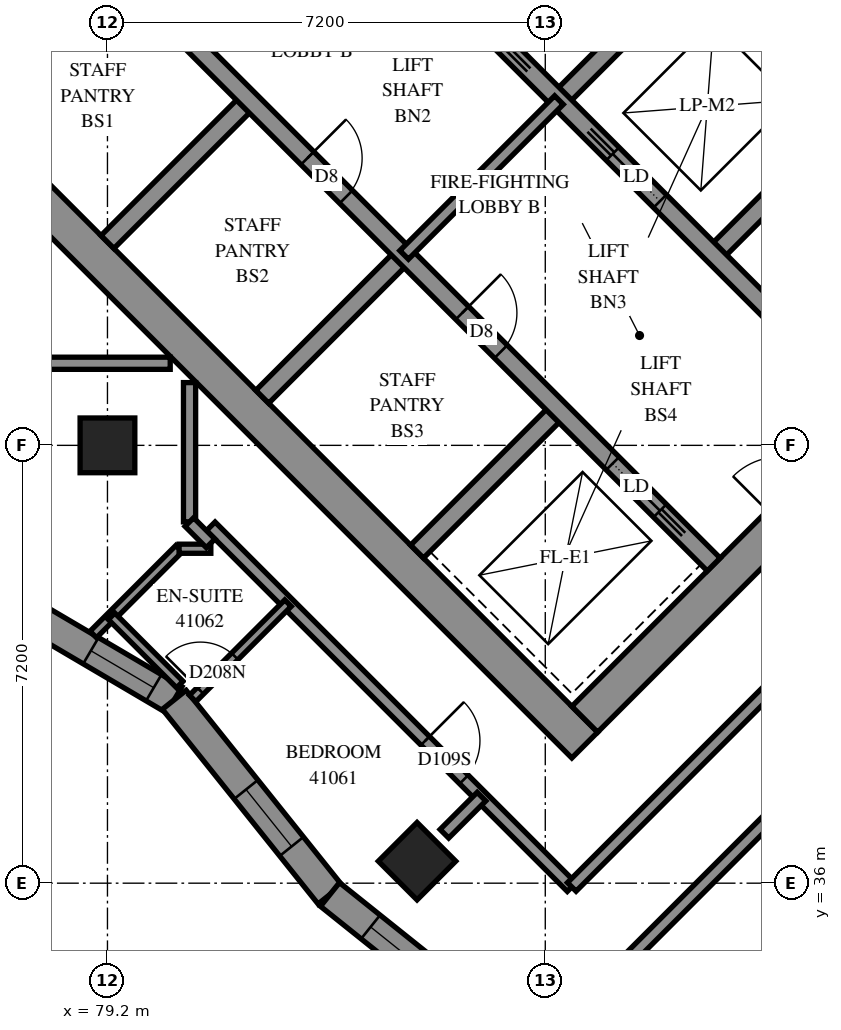
"""IFC4 building model, lengths in metres.
Left out: names, types, materials, properties, quantities, classifications, styles, units other than length and angle.
Written with IfcOpenShell. Run it as: python <this file> out.ifc"""

import sys

from ifc_helpers import new_model, si_unit, direction, frame, frame_2d, origin, origin_2d, place, context, subcontext, project, spatial, polyline, rectangle, outline, extrude, element, fill, save


model = new_model("IFC4")
c1 = context("Model", 3, precision=1e-05, world=origin(), true_north=direction((0.0, 1.0)))
c2 = subcontext(c1, "Body", "Model", "MODEL_VIEW")
j1 = project(units=[si_unit("LENGTHUNIT", "METRE"), si_unit("PLANEANGLEUNIT", "RADIAN")], contexts=[c1])
p1 = place(None, origin())
s1 = spatial("IfcSite", under=j1, at=p1, CompositionType="ELEMENT")
p2 = place(p1, origin())
s2 = spatial("IfcBuilding", under=s1, at=p2, CompositionType="ELEMENT")
p3 = place(p2, frame((0.0, 0.0, 152.4)))
s3 = spatial("IfcBuildingStorey", under=s2, at=p3, CompositionType="ELEMENT", Elevation=152.4)
for number, where, z_axis, x_axis in (
    (1, (79.2, 43.2, 0.0), (0.0, 0.0, 1.0), (1.0, 0.0, 0.0)),
    (2, (84.291, 36.362, 0.0), (0.0, 0.0, 1.0), (0.707, -0.707, 0.0)),
):
    element("IfcColumn", number, at=place(p3, frame(where, z_axis=z_axis, x_axis=x_axis)), inside=s3, PredefinedType="COLUMN", context=c2, shape_type="SweptSolid", body=[
        extrude(rectangle(XDim=0.9, YDim=0.9, at=origin_2d()), origin(), (0.0, 0.0, 1.0), 3.1),
    ])
p4 = place(p3, frame((76.018, 49.302, -0.3), z_axis=(0.0, 0.0, 1.0), x_axis=(0.7071067812, -0.7071067812, 0.0)))
e3 = element("IfcWall", 3, at=p4, inside=s3, PredefinedType="SHEAR", context=c2, shape_type="SweptSolid", body=[
    extrude(rectangle(XDim=15.6, YDim=0.6, at=frame_2d((7.8, 0.0))), origin(), (0.0, 0.0, 1.0), 2.7),
])
p5 = place(p3, frame((86.625, 59.908, -0.3), z_axis=(0.0, 0.0, 1.0), x_axis=(0.7071067812, -0.7071067812, 0.0)))
e4 = element("IfcWall", 4, at=p5, inside=s3, PredefinedType="SHEAR", context=c2, shape_type="SweptSolid", body=[
    extrude(rectangle(XDim=15.6, YDim=0.6, at=frame_2d((7.8, 0.0))), origin(), (0.0, 0.0, 1.0), 2.7),
])
p6 = place(p5, frame((10.6, 0.0, 0.3)))
e5 = element("IfcOpeningElement", 5, at=p6, cuts=e4, PredefinedType="OPENING", context=c2, shape_type="SweptSolid", body=[
    extrude(rectangle(XDim=0.8, YDim=2.1, at=frame_2d((0.4, 1.05))), frame((0.0, 0.31, 0.0), z_axis=(0.0, -1.0, 0.0), x_axis=(1.0, 0.0, 0.0)), (0.0, 0.0, 1.0), 0.62),
])
p7 = place(p3, frame((76.442, 49.302, -0.3), z_axis=(0.0, 0.0, 1.0), x_axis=(0.7071067812, 0.7071067812, 0.0)))
e6 = element("IfcWall", 6, at=p7, inside=s3, PredefinedType="SHEAR", context=c2, shape_type="SweptSolid", body=[
    extrude(rectangle(XDim=14.4, YDim=0.6, at=frame_2d((7.2, 0.0))), origin(), (0.0, 0.0, 1.0), 2.7),
])
p8 = place(p7, frame((4.55, 0.0, 0.3)))
e7 = element("IfcOpeningElement", 7, at=p8, cuts=e6, PredefinedType="OPENING", context=c2, shape_type="SweptSolid", body=[
    extrude(rectangle(XDim=1.1, YDim=2.1, at=frame_2d((0.55, 1.05))), frame((0.0, 0.31, 0.0), z_axis=(0.0, -1.0, 0.0), x_axis=(1.0, 0.0, 0.0)), (0.0, 0.0, 1.0), 0.62),
])
p9 = place(p7, frame((11.35, 0.0, 0.3)))
e8 = element("IfcOpeningElement", 8, at=p9, cuts=e6, PredefinedType="OPENING", context=c2, shape_type="SweptSolid", body=[
    extrude(rectangle(XDim=1.1, YDim=2.1, at=frame_2d((0.55, 1.05))), frame((0.0, 0.31, 0.0), z_axis=(0.0, -1.0, 0.0), x_axis=(1.0, 0.0, 0.0)), (0.0, 0.0, 1.0), 0.62),
])
p10 = place(p3, frame((87.049, 38.695, -0.3), z_axis=(0.0, 0.0, 1.0), x_axis=(0.7071067812, 0.7071067812, 0.0)))
e9 = element("IfcWall", 9, at=p10, inside=s3, PredefinedType="SHEAR", context=c2, shape_type="SweptSolid", body=[
    extrude(rectangle(XDim=14.4, YDim=0.6, at=frame_2d((7.2, 0.0))), origin(), (0.0, 0.0, 1.0), 2.7),
])
p11 = place(p10, frame((4.55, 0.0, 0.3)))
e10 = element("IfcOpeningElement", 10, at=p11, cuts=e9, PredefinedType="OPENING", context=c2, shape_type="SweptSolid", body=[
    extrude(rectangle(XDim=1.1, YDim=2.1, at=frame_2d((0.55, 1.05))), frame((0.0, 0.31, 0.0), z_axis=(0.0, -1.0, 0.0), x_axis=(1.0, 0.0, 0.0)), (0.0, 0.0, 1.0), 0.62),
])
p12 = place(p10, frame((11.35, 0.0, 0.3)))
e11 = element("IfcOpeningElement", 11, at=p12, cuts=e9, PredefinedType="OPENING", context=c2, shape_type="SweptSolid", body=[
    extrude(rectangle(XDim=1.1, YDim=2.1, at=frame_2d((0.55, 1.05))), frame((0.0, 0.31, 0.0), z_axis=(0.0, -1.0, 0.0), x_axis=(1.0, 0.0, 0.0)), (0.0, 0.0, 1.0), 0.62),
])
p13 = place(p3, frame((79.2, 46.544, 0.0), z_axis=(0.0, 0.0, 1.0), x_axis=(0.7071219326, 0.7070916295, 0.0)))
e12 = element("IfcWall", 12, at=p13, inside=s3, PredefinedType="SOLIDWALL", context=c2, shape_type="SweptSolid", body=[
    extrude(rectangle(XDim=3.3, YDim=0.3, at=frame_2d((1.65, 0.0))), origin(), (0.0, 0.0, 1.0), 3.1),
])
p14 = place(p3, frame((81.746, 43.999, 0.0), z_axis=(0.0, 0.0, 1.0), x_axis=(0.7071067812, 0.7071067812, 0.0)))
e13 = element("IfcWall", 13, at=p14, inside=s3, PredefinedType="SOLIDWALL", context=c2, shape_type="SweptSolid", body=[
    extrude(rectangle(XDim=3.3, YDim=0.3, at=frame_2d((1.65, 0.0))), origin(), (0.0, 0.0, 1.0), 3.1),
])
p15 = place(p3, frame((86.625, 48.878, 0.0), z_axis=(0.0, 0.0, 1.0), x_axis=(0.7071067812, 0.7071067812, 0.0)))
e14 = element("IfcWall", 14, at=p15, inside=s3, PredefinedType="SOLIDWALL", context=c2, shape_type="SweptSolid", body=[
    extrude(rectangle(XDim=3.3, YDim=0.3, at=frame_2d((1.65, 0.0))), origin(), (0.0, 0.0, 1.0), 3.1),
])
p16 = place(p3, frame((84.291, 41.453, 0.0), z_axis=(0.0, 0.0, 1.0), x_axis=(0.7071067812, 0.7071067812, 0.0)))
e15 = element("IfcWall", 15, at=p16, inside=s3, PredefinedType="SOLIDWALL", context=c2, shape_type="SweptSolid", body=[
    extrude(rectangle(XDim=3.3, YDim=0.3, at=frame_2d((1.65, 0.0))), origin(), (0.0, 0.0, 1.0), 3.1),
])
p17 = place(p3, frame((89.17, 46.332, 0.0), z_axis=(0.0, 0.0, 1.0), x_axis=(0.7071067812, 0.7071067812, 0.0)))
e16 = element("IfcWall", 16, at=p17, inside=s3, PredefinedType="SOLIDWALL", context=c2, shape_type="SweptSolid", body=[
    extrude(rectangle(XDim=3.3, YDim=0.3, at=frame_2d((1.65, 0.0))), origin(), (0.0, 0.0, 1.0), 3.1),
])
p18 = place(p3, frame((78.988, 51.423, 0.0), z_axis=(0.0, 0.0, 1.0), x_axis=(0.7071067812, -0.7071067812, 0.0)))
e17 = element("IfcWall", 17, at=p18, inside=s3, PredefinedType="SOLIDWALL", context=c2, shape_type="SweptSolid", body=[
    extrude(rectangle(XDim=14.4, YDim=0.3, at=frame_2d((7.2, 0.0))), origin(), (0.0, 0.0, 1.0), 3.1),
])
p19 = place(p18, frame((1.35, 0.0, 0.0)))
e18 = element("IfcOpeningElement", 18, at=p19, cuts=e17, PredefinedType="OPENING", context=c2, shape_type="SweptSolid", body=[
    extrude(rectangle(XDim=0.9, YDim=2.1, at=frame_2d((0.45, 1.05))), frame((0.0, 0.16, 0.0), z_axis=(0.0, -1.0, 0.0), x_axis=(1.0, 0.0, 0.0)), (0.0, 0.0, 1.0), 0.32),
])
p20 = place(p18, frame((4.95, 0.0, 0.0)))
e19 = element("IfcOpeningElement", 19, at=p20, cuts=e17, PredefinedType="OPENING", context=c2, shape_type="SweptSolid", body=[
    extrude(rectangle(XDim=0.9, YDim=2.1, at=frame_2d((0.45, 1.05))), frame((0.0, 0.16, 0.0), z_axis=(0.0, -1.0, 0.0), x_axis=(1.0, 0.0, 0.0)), (0.0, 0.0, 1.0), 0.32),
])
p21 = place(p18, frame((8.55, 0.0, 0.0)))
e20 = element("IfcOpeningElement", 20, at=p21, cuts=e17, PredefinedType="OPENING", context=c2, shape_type="SweptSolid", body=[
    extrude(rectangle(XDim=0.9, YDim=2.1, at=frame_2d((0.45, 1.05))), frame((0.0, 0.16, 0.0), z_axis=(0.0, -1.0, 0.0), x_axis=(1.0, 0.0, 0.0)), (0.0, 0.0, 1.0), 0.32),
])
p22 = place(p18, frame((12.05, 0.0, 0.0)))
e21 = element("IfcOpeningElement", 21, at=p22, cuts=e17, PredefinedType="OPENING", context=c2, shape_type="SweptSolid", body=[
    extrude(rectangle(XDim=1.1, YDim=2.1, at=frame_2d((0.55, 1.05))), frame((0.0, 0.16, 0.0), z_axis=(0.0, -1.0, 0.0), x_axis=(1.0, 0.0, 0.0)), (0.0, 0.0, 1.0), 0.32),
])
p23 = place(p3, frame((81.534, 53.969, 0.0), z_axis=(0.0, 0.0, 1.0), x_axis=(0.707103309, -0.7071102534, 0.0)))
e22 = element("IfcWall", 22, at=p23, inside=s3, PredefinedType="SOLIDWALL", context=c2, shape_type="SweptSolid", body=[
    extrude(rectangle(XDim=14.4, YDim=0.3, at=frame_2d((7.2, 0.0))), origin(), (0.0, 0.0, 1.0), 3.1),
])
p24 = place(p23, frame((1.25, 0.0, 0.0)))
e23 = element("IfcOpeningElement", 23, at=p24, cuts=e22, PredefinedType="OPENING", context=c2, shape_type="SweptSolid", body=[
    extrude(rectangle(XDim=1.1, YDim=2.1, at=frame_2d((0.55, 1.05))), frame((0.0, 0.16, 0.0), z_axis=(0.0, -1.0, 0.0), x_axis=(1.0, 0.0, 0.0)), (0.0, 0.0, 1.0), 0.32),
])
p25 = place(p23, frame((4.85, 0.0, 0.0)))
e24 = element("IfcOpeningElement", 24, at=p25, cuts=e22, PredefinedType="OPENING", context=c2, shape_type="SweptSolid", body=[
    extrude(rectangle(XDim=1.1, YDim=2.1, at=frame_2d((0.55, 1.05))), frame((0.0, 0.16, 0.0), z_axis=(0.0, -1.0, 0.0), x_axis=(1.0, 0.0, 0.0)), (0.0, 0.0, 1.0), 0.32),
])
p26 = place(p23, frame((8.45, 0.0, 0.0)))
e25 = element("IfcOpeningElement", 25, at=p26, cuts=e22, PredefinedType="OPENING", context=c2, shape_type="SweptSolid", body=[
    extrude(rectangle(XDim=1.1, YDim=2.1, at=frame_2d((0.55, 1.05))), frame((0.0, 0.16, 0.0), z_axis=(0.0, -1.0, 0.0), x_axis=(1.0, 0.0, 0.0)), (0.0, 0.0, 1.0), 0.32),
])
p27 = place(p23, frame((12.05, 0.0, 0.0)))
e26 = element("IfcOpeningElement", 26, at=p27, cuts=e22, PredefinedType="OPENING", context=c2, shape_type="SweptSolid", body=[
    extrude(rectangle(XDim=1.1, YDim=2.1, at=frame_2d((0.55, 1.05))), frame((0.0, 0.16, 0.0), z_axis=(0.0, -1.0, 0.0), x_axis=(1.0, 0.0, 0.0)), (0.0, 0.0, 1.0), 0.32),
])
p28 = place(p3, frame((88.958, 51.211, 0.0), z_axis=(0.0, 0.0, 1.0), x_axis=(0.7070998367, -0.7071137256, 0.0)))
e27 = element("IfcWall", 27, at=p28, inside=s3, PredefinedType="SOLIDWALL", context=c2, shape_type="SweptSolid", body=[
    extrude(rectangle(XDim=7.2, YDim=0.3, at=frame_2d((3.6, 0.0))), origin(), (0.0, 0.0, 1.0), 3.1),
])
p29 = place(p3, frame((76.622, 41.179, 0.0), z_axis=(0.0, 0.0, 1.0), x_axis=(0.8618612856, -0.5071440864, 0.0)))
e28 = element("IfcWall", 28, at=p29, inside=s3, PredefinedType="SOLIDWALL", context=c2, shape_type="SweptSolid", body=[
    extrude(outline(polyline([(0.029, -0.25), (4.22, -0.25), (4.312, 0.25), (-0.029, 0.25), (0.029, -0.25)])), origin(), (0.0, 0.0, 1.0), 3.1),
])
p30 = place(p29, frame((0.342, 0.0, 0.45)))
e29 = element("IfcOpeningElement", 29, at=p30, cuts=e28, PredefinedType="OPENING", context=c2, shape_type="SweptSolid", body=[
    extrude(rectangle(XDim=1.2, YDim=2.5, at=frame_2d((0.6, 1.25))), frame((0.0, 0.26, 0.0), z_axis=(0.0, -1.0, 0.0), x_axis=(1.0, 0.0, 0.0)), (0.0, 0.0, 1.0), 0.52),
])
p31 = place(p29, frame((2.674, 0.0, 0.45)))
e30 = element("IfcOpeningElement", 30, at=p31, cuts=e28, PredefinedType="OPENING", context=c2, shape_type="SweptSolid", body=[
    extrude(rectangle(XDim=1.2, YDim=2.5, at=frame_2d((0.6, 1.25))), frame((0.0, 0.26, 0.0), z_axis=(0.0, -1.0, 0.0), x_axis=(1.0, 0.0, 0.0)), (0.0, 0.0, 1.0), 0.52),
])
p32 = place(p3, frame((80.299, 39.016, 0.0), z_axis=(0.0, 0.0, 1.0), x_axis=(0.6246355526, -0.7809164017, 0.0)))
e31 = element("IfcWall", 31, at=p32, inside=s3, PredefinedType="SOLIDWALL", context=c2, shape_type="SweptSolid", body=[
    extrude(outline(polyline([(0.046, -0.25), (4.127, -0.25), (4.072, 0.25), (-0.046, 0.25), (0.046, -0.25)])), origin(), (0.0, 0.0, 1.0), 3.1),
])
p33 = place(p32, frame((1.889, 0.0, 0.45)))
e32 = element("IfcOpeningElement", 32, at=p33, cuts=e31, PredefinedType="OPENING", context=c2, shape_type="SweptSolid", body=[
    extrude(rectangle(XDim=1.2, YDim=2.5, at=frame_2d((0.6, 1.25))), frame((0.0, 0.26, 0.0), z_axis=(0.0, -1.0, 0.0), x_axis=(1.0, 0.0, 0.0)), (0.0, 0.0, 1.0), 0.52),
])
p34 = place(p3, frame((82.859, 35.815, 0.0), z_axis=(0.0, 0.0, 1.0), x_axis=(0.7809237862, -0.6246263204, 0.0)))
e33 = element("IfcWall", 33, at=p34, inside=s3, PredefinedType="SOLIDWALL", context=c2, shape_type="SweptSolid", body=[
    extrude(outline(polyline([(-0.028, -0.25), (4.054, -0.25), (4.109, 0.25), (0.028, 0.25), (-0.028, -0.25)])), origin(), (0.0, 0.0, 1.0), 3.1),
])
p35 = place(p34, frame((0.855, 0.0, 0.45)))
e34 = element("IfcOpeningElement", 34, at=p35, cuts=e33, PredefinedType="OPENING", context=c2, shape_type="SweptSolid", body=[
    extrude(rectangle(XDim=2.8, YDim=2.5, at=frame_2d((1.4, 1.25))), frame((0.0, 0.26, 0.0), z_axis=(0.0, -1.0, 0.0), x_axis=(1.0, 0.0, 0.0)), (0.0, 0.0, 1.0), 0.52),
])
p36 = place(p3, frame((84.079, 46.332, 0.0), z_axis=(0.0, 0.0, 1.0), x_axis=(0.7071067812, 0.7071067812, 0.0)))
e35 = element("IfcWall", 35, at=p36, inside=s3, PredefinedType="PARTITIONING", context=c2, shape_type="SweptSolid", body=[
    extrude(rectangle(XDim=3.6, YDim=0.2, at=frame_2d((1.8, 0.0))), origin(), (0.0, 0.0, 1.0), 3.1),
])
p37 = place(p3, frame((80.899, 41.869, 0.0), z_axis=(0.0, 0.0, 1.0), x_axis=(0.7071067812, -0.7071067812, 0.0)))
e36 = element("IfcWall", 36, at=p37, inside=s3, PredefinedType="PARTITIONING", context=c2, shape_type="SweptSolid", body=[
    extrude(rectangle(XDim=8.392, YDim=0.2, at=frame_2d((4.196, 0.0))), origin(), (0.0, 0.0, 1.0), 3.1),
])
p38 = place(p37, frame((4.988, 0.0, 0.0)))
e37 = element("IfcOpeningElement", 37, at=p38, cuts=e36, PredefinedType="OPENING", context=c2, shape_type="SweptSolid", body=[
    extrude(rectangle(XDim=0.9, YDim=2.1, at=frame_2d((0.45, 1.05))), frame((0.0, 0.11, 0.0), z_axis=(0.0, -1.0, 0.0), x_axis=(1.0, 0.0, 0.0)), (0.0, 0.0, 1.0), 0.22),
])
p39 = place(p3, frame((86.836, 35.938, 0.0), z_axis=(0.0, 0.0, 1.0), x_axis=(0.7071067812, 0.7071067812, 0.0)))
e38 = element("IfcWall", 38, at=p39, inside=s3, PredefinedType="PARTITIONING", context=c2, shape_type="SweptSolid", body=[
    extrude(rectangle(XDim=8.2, YDim=0.2, at=frame_2d((4.1, 0.0))), origin(), (0.0, 0.0, 1.0), 3.1),
])
p40 = place(p3, frame((86.33, 33.311, 0.0), z_axis=(0.0, 0.0, 1.0), x_axis=(0.707100543, 0.7071130194, 0.0)))
e39 = element("IfcWall", 39, at=p40, inside=s3, PredefinedType="PARTITIONING", context=c2, shape_type="SweptSolid", body=[
    extrude(rectangle(XDim=8.015, YDim=0.2, at=frame_2d((4.008, 0.0))), origin(), (0.0, 0.0, 1.0), 3.1),
])
p41 = place(p3, frame((89.831, 31.721, 0.0), z_axis=(0.0, 0.0, 1.0), x_axis=(0.7071067812, 0.7071067812, 0.0)))
e40 = element("IfcWall", 40, at=p41, inside=s3, PredefinedType="PARTITIONING", context=c2, shape_type="SweptSolid", body=[
    extrude(rectangle(XDim=5.928, YDim=0.2, at=frame_2d((2.964, 0.0))), origin(), (0.0, 0.0, 1.0), 3.1),
])
for number, where, z_axis, x_axis in (
    (41, (77.942, 44.55, 0.0), (0.0, 0.0, 1.0), (1.0, 0.0, 0.0)),
    (42, (80.55, 41.942, 0.0), (0.0, 0.0, 1.0), (0.0, 1.0, 0.0)),
):
    element("IfcWall", number, at=place(p3, frame(where, z_axis=z_axis, x_axis=x_axis)), inside=s3, PredefinedType="PARTITIONING", context=c2, shape_type="SweptSolid", body=[
        extrude(rectangle(XDim=2.29, YDim=0.2, at=frame_2d((1.145, 0.0))), origin(), (0.0, 0.0, 1.0), 3.1),
    ])
p42 = place(p3, frame((80.601, 39.038, 0.0), z_axis=(0.0, 0.0, 1.0), x_axis=(0.7071293353, 0.7070842263, 0.0)))
e43 = element("IfcWall", 43, at=p42, inside=s3, PredefinedType="PARTITIONING", context=c2, shape_type="SweptSolid", body=[
    extrude(rectangle(XDim=2.217, YDim=0.15, at=frame_2d((1.108, 0.0))), origin(), (0.0, 0.0, 1.0), 3.1),
])
p43 = place(p42, frame((0.18, 0.0, 0.0)))
e44 = element("IfcOpeningElement", 44, at=p43, cuts=e43, PredefinedType="OPENING", context=c2, shape_type="SweptSolid", body=[
    extrude(rectangle(XDim=0.8, YDim=2.1, at=frame_2d((0.4, 1.05))), frame((0.0, 0.085, 0.0), z_axis=(0.0, -1.0, 0.0), x_axis=(1.0, 0.0, 0.0)), (0.0, 0.0, 1.0), 0.17),
])
p44 = place(p3, frame((78.967, 40.09, 0.0), z_axis=(0.0, 0.0, 1.0), x_axis=(0.7071067812, 0.7071067812, 0.0)))
e45 = element("IfcWall", 45, at=p44, inside=s3, PredefinedType="PARTITIONING", context=c2, shape_type="SweptSolid", body=[
    extrude(rectangle(XDim=1.995, YDim=0.15, at=frame_2d((0.998, 0.0))), origin(), (0.0, 0.0, 1.0), 3.1),
])
p45 = place(p3, frame((79.267, 40.389, 0.0), z_axis=(0.0, 0.0, 1.0), x_axis=(0.7071067812, -0.7071067812, 0.0)))
e46 = element("IfcWall", 46, at=p45, inside=s3, PredefinedType="PARTITIONING", context=c2, shape_type="SweptSolid", body=[
    extrude(rectangle(XDim=1.587, YDim=0.15, at=frame_2d((0.794, 0.0))), origin(), (0.0, 0.0, 1.0), 3.1),
])
p46 = place(p3, frame((84.741, 36.813, 0.0), z_axis=(0.0, 0.0, 1.0), x_axis=(0.7071067812, 0.7071067812, 0.0)))
e47 = element("IfcWall", 47, at=p46, inside=s3, PredefinedType="PARTITIONING", context=c2, shape_type="SweptSolid", body=[
    extrude(rectangle(XDim=0.863, YDim=0.2, at=frame_2d((0.431, 0.0))), origin(), (0.0, 0.0, 1.0), 3.1),
])
p47 = place(p3, frame((80.378, 41.5, 0.0), z_axis=(0.0, 0.0, 1.0), x_axis=(1.0, 0.0, 0.0)))
e48 = element("IfcWall", 48, at=p47, inside=s3, PredefinedType="PARTITIONING", context=c2, shape_type="SweptSolid", body=[
    extrude(rectangle(XDim=0.522, YDim=0.15, at=frame_2d((0.261, 0.0))), origin(), (0.0, 0.0, 1.0), 3.1),
])
p48 = place(p3, frame((80.546, 41.938, 0.0), z_axis=(0.0, 0.0, 1.0), x_axis=(0.7071067812, -0.7071067812, 0.0)))
e49 = element("IfcWall", 49, at=p48, inside=s3, PredefinedType="PARTITIONING", context=c2, shape_type="SweptSolid", body=[
    extrude(rectangle(XDim=0.495, YDim=0.2, at=frame_2d((0.247, 0.0))), origin(), (0.0, 0.0, 1.0), 3.1),
])
p49 = place(p31, origin())
e50 = element("IfcWindow", 50, at=p49, inside=s3, PartitioningType="SINGLE_PANEL", PredefinedType="WINDOW", context=c2, shape_type="SweptSolid", body=[
    extrude(rectangle(XDim=1.2, YDim=2.5, at=frame_2d((0.6, 1.25))), frame((0.0, 0.18, 0.0), z_axis=(0.0, -1.0, 0.0), x_axis=(1.0, 0.0, 0.0)), (0.0, 0.0, 1.0), 0.06),
])
fill(e30, e50)
p50 = place(p33, origin())
e51 = element("IfcWindow", 51, at=p50, inside=s3, PartitioningType="SINGLE_PANEL", PredefinedType="WINDOW", context=c2, shape_type="SweptSolid", body=[
    extrude(rectangle(XDim=1.2, YDim=2.5, at=frame_2d((0.6, 1.25))), frame((0.0, 0.18, 0.0), z_axis=(0.0, -1.0, 0.0), x_axis=(1.0, 0.0, 0.0)), (0.0, 0.0, 1.0), 0.06),
])
fill(e32, e51)
p51 = place(p35, origin())
e52 = element("IfcWindow", 52, at=p51, inside=s3, PartitioningType="SINGLE_PANEL", PredefinedType="WINDOW", context=c2, shape_type="SweptSolid", body=[
    extrude(rectangle(XDim=2.8, YDim=2.5, at=frame_2d((1.4, 1.25))), frame((0.0, 0.18, 0.0), z_axis=(0.0, -1.0, 0.0), x_axis=(1.0, 0.0, 0.0)), (0.0, 0.0, 1.0), 0.06),
])
fill(e34, e52)
p52 = place(p20, origin())
e53 = element("IfcDoor", 53, at=p52, inside=s3, OperationType="SINGLE_SWING_LEFT", PredefinedType="DOOR", context=c2, shape_type="SweptSolid", body=[
    extrude(rectangle(XDim=0.9, YDim=2.1, at=frame_2d((0.45, 1.05))), frame((0.0, 0.025, 0.0), z_axis=(0.0, -1.0, 0.0), x_axis=(1.0, 0.0, 0.0)), (0.0, 0.0, 1.0), 0.05),
])
fill(e19, e53)
p53 = place(p21, origin())
e54 = element("IfcDoor", 54, at=p53, inside=s3, OperationType="SINGLE_SWING_LEFT", PredefinedType="DOOR", context=c2, shape_type="SweptSolid", body=[
    extrude(rectangle(XDim=0.9, YDim=2.1, at=frame_2d((0.45, 1.05))), frame((0.0, 0.025, 0.0), z_axis=(0.0, -1.0, 0.0), x_axis=(1.0, 0.0, 0.0)), (0.0, 0.0, 1.0), 0.05),
])
fill(e20, e54)
p54 = place(p22, origin())
e55 = element("IfcDoor", 55, at=p54, inside=s3, OperationType="SLIDING_TO_RIGHT", PredefinedType="DOOR", context=c2, shape_type="SweptSolid", body=[
    extrude(rectangle(XDim=1.1, YDim=2.1, at=frame_2d((0.55, 1.05))), frame((0.0, 0.025, 0.0), z_axis=(0.0, -1.0, 0.0), x_axis=(1.0, 0.0, 0.0)), (0.0, 0.0, 1.0), 0.05),
])
fill(e21, e55)
p55 = place(p26, origin())
e56 = element("IfcDoor", 56, at=p55, inside=s3, OperationType="SLIDING_TO_LEFT", PredefinedType="DOOR", context=c2, shape_type="SweptSolid", body=[
    extrude(rectangle(XDim=1.1, YDim=2.1, at=frame_2d((0.55, 1.05))), frame((0.0, 0.025, 0.0), z_axis=(0.0, -1.0, 0.0), x_axis=(1.0, 0.0, 0.0)), (0.0, 0.0, 1.0), 0.05),
])
fill(e25, e56)
p56 = place(p38, origin())
e57 = element("IfcDoor", 57, at=p56, inside=s3, OperationType="SINGLE_SWING_RIGHT", PredefinedType="DOOR", context=c2, shape_type="SweptSolid", body=[
    extrude(rectangle(XDim=0.9, YDim=2.1, at=frame_2d((0.45, 1.05))), frame((0.0, 0.025, 0.0), z_axis=(0.0, -1.0, 0.0), x_axis=(1.0, 0.0, 0.0)), (0.0, 0.0, 1.0), 0.05),
])
fill(e37, e57)
p57 = place(p43, origin())
e58 = element("IfcDoor", 58, at=p57, inside=s3, OperationType="SINGLE_SWING_RIGHT", PredefinedType="DOOR", context=c2, shape_type="SweptSolid", body=[
    extrude(rectangle(XDim=0.8, YDim=2.1, at=frame_2d((0.4, 1.05))), frame((0.0, 0.025, 0.0), z_axis=(0.0, -1.0, 0.0), x_axis=(1.0, 0.0, 0.0)), (0.0, 0.0, 1.0), 0.05),
])
fill(e44, e58)
save(model, sys.argv[1])
